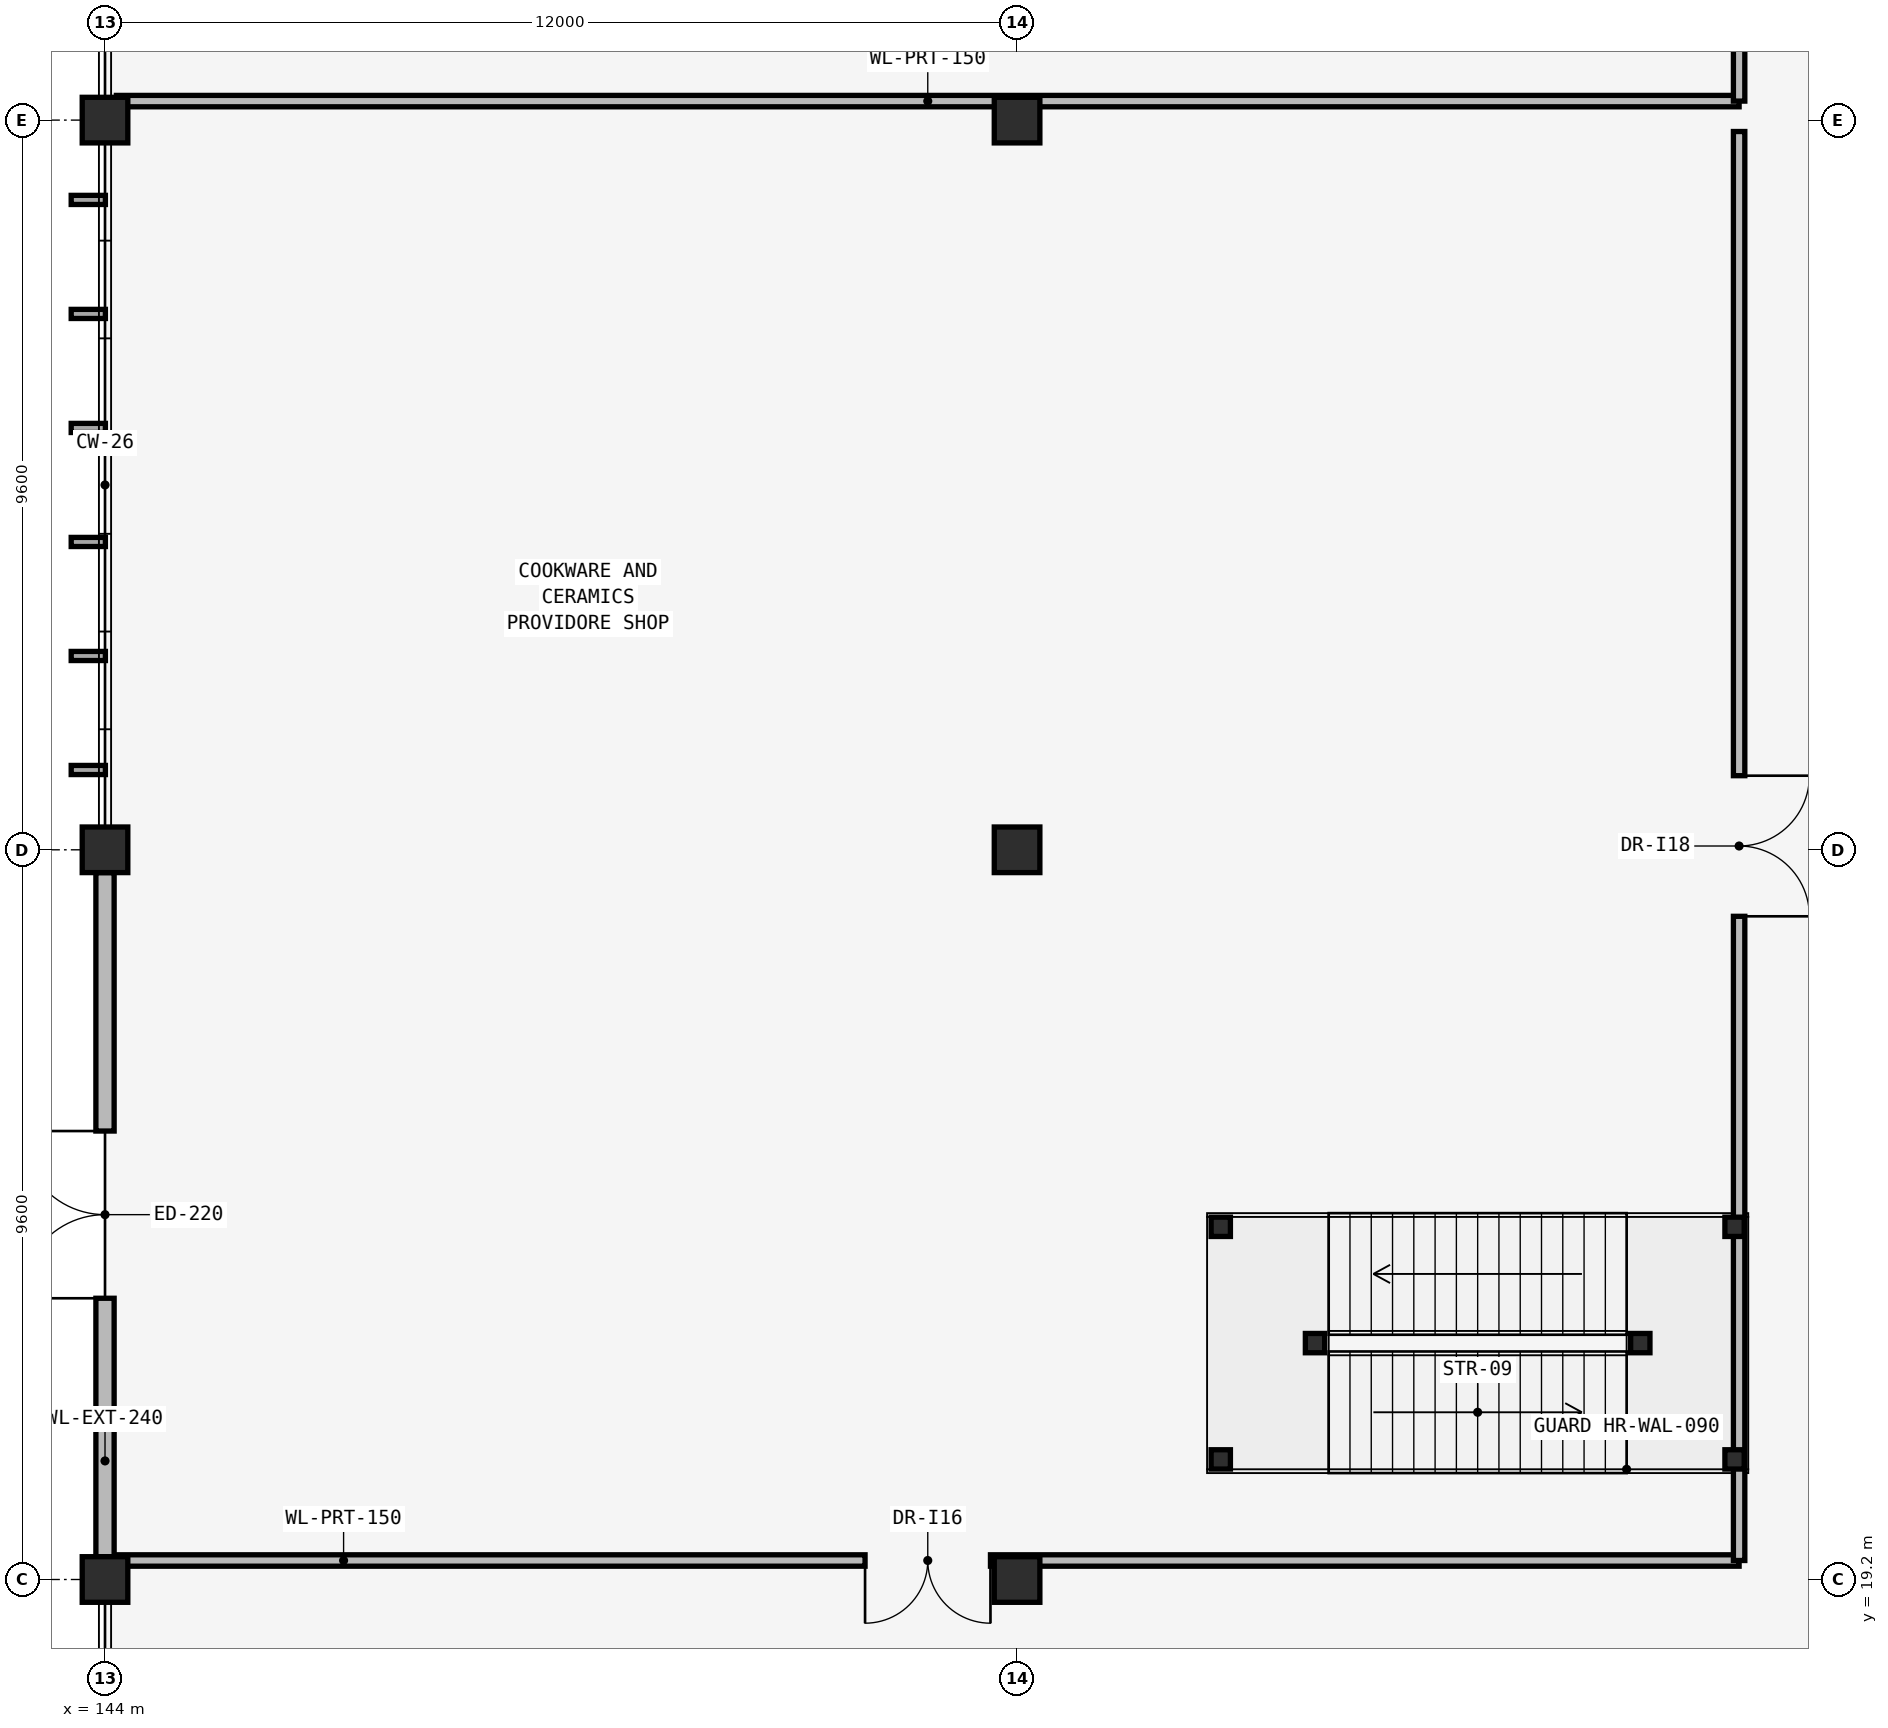
"""IFC4 building model, lengths in metres.
Left out: names, types, materials, properties, quantities, classifications, styles, units other than length and angle.
Written with IfcOpenShell. Run it as: python <this file> out.ifc"""

import sys

from ifc_helpers import new_model, si_unit, direction, frame, frame_2d, origin, origin_2d, place, context, subcontext, project, spatial, rectangle, i_section, extrude, element, fill, save


model = new_model("IFC4")
c1 = context("Model", 3, precision=1e-05, world=origin(), true_north=direction((0.0, 1.0)))
c2 = subcontext(c1, "Body", "Model", "MODEL_VIEW")
j1 = project(units=[si_unit("LENGTHUNIT", "METRE"), si_unit("PLANEANGLEUNIT", "RADIAN")], contexts=[c1])
p1 = place(None, origin())
s1 = spatial("IfcSite", under=j1, at=p1, CompositionType="ELEMENT")
p2 = place(p1, origin())
s2 = spatial("IfcBuilding", under=s1, at=p2, CompositionType="ELEMENT")
p3 = place(p2, origin())
s3 = spatial("IfcBuildingStorey", under=s2, at=p3, CompositionType="ELEMENT", Elevation=0.0)
for number, where, z_axis, x_axis in (
    (1, (144.0, 19.2, 0.0), (0.0, 0.0, 1.0), (1.0, 0.0, 0.0)),
    (2, (144.0, 28.8, 0.0), (0.0, 0.0, 1.0), (1.0, 0.0, 0.0)),
    (3, (144.0, 38.4, 0.0), (0.0, 0.0, 1.0), (1.0, 0.0, 0.0)),
    (4, (156.0, 19.2, 0.0), (0.0, 0.0, 1.0), (1.0, 0.0, 0.0)),
    (5, (156.0, 28.8, 0.0), (0.0, 0.0, 1.0), (1.0, 0.0, 0.0)),
    (6, (156.0, 38.4, 0.0), (0.0, 0.0, 1.0), (1.0, 0.0, 0.0)),
):
    element("IfcColumn", number, at=place(p3, frame(where, z_axis=z_axis, x_axis=x_axis)), inside=s3, PredefinedType="COLUMN", context=c2, shape_type="SweptSolid", body=[
        extrude(rectangle(XDim=0.6, YDim=0.6, at=origin_2d()), origin(), (0.0, 0.0, 1.0), 5.4),
    ])
for number, where, z_axis, x_axis in (
    (7, (165.44, 20.78, 0.0), (0.0, 0.0, 1.0), (1.0, 0.0, 0.0)),
    (8, (165.44, 23.84, 0.0), (0.0, 0.0, 1.0), (1.0, 0.0, 0.0)),
    (9, (164.2, 22.31, 0.0), (0.0, 0.0, 1.0), (1.0, 0.0, 0.0)),
    (10, (158.68, 20.78, 0.0), (0.0, 0.0, 1.0), (1.0, 0.0, 0.0)),
    (11, (158.68, 23.84, 0.0), (0.0, 0.0, 1.0), (1.0, 0.0, 0.0)),
    (12, (159.92, 22.31, 0.0), (0.0, 0.0, 1.0), (1.0, 0.0, 0.0)),
):
    element("IfcColumn", number, at=place(p3, frame(where, z_axis=z_axis, x_axis=x_axis)), inside=s3, PredefinedType="COLUMN", context=c2, shape_type="SweptSolid", body=[
        extrude(i_section(OverallWidth=0.254, OverallDepth=0.254, WebThickness=0.009, FlangeThickness=0.014, at=origin_2d()), origin(), (0.0, 0.0, 1.0), 5.2),
    ])
p4 = place(p3, frame((144.0, 19.5, 0.0), z_axis=(0.0, 0.0, 1.0), x_axis=(0.0, 1.0, 0.0)))
e13 = element("IfcWall", 13, at=p4, inside=s3, PredefinedType="SOLIDWALL", context=c2, shape_type="SweptSolid", body=[
    extrude(rectangle(XDim=9.0, YDim=0.24, at=frame_2d((4.5, 0.0))), origin(), (0.0, 0.0, 1.0), 4.321),
])
p5 = place(p4, frame((3.4, 0.0, 0.0)))
e14 = element("IfcOpeningElement", 14, at=p5, cuts=e13, PredefinedType="OPENING", context=c2, shape_type="SweptSolid", body=[
    extrude(rectangle(XDim=2.2, YDim=2.4, at=frame_2d((1.1, 1.2))), frame((0.0, 0.135, 0.0), z_axis=(0.0, -1.0, 0.0), x_axis=(1.0, 0.0, 0.0)), (0.0, 0.0, 1.0), 0.27),
])
p6 = place(p3, frame((144.15, 19.45, 0.0), z_axis=(0.0, 0.0, 1.0), x_axis=(1.0, 0.0, 0.0)))
e15 = element("IfcWall", 15, at=p6, inside=s3, PredefinedType="PARTITIONING", context=c2, shape_type="SweptSolid", body=[
    extrude(rectangle(XDim=21.35, YDim=0.15, at=frame_2d((10.675, 0.0))), origin(), (0.0, 0.0, 1.0), 5.08),
])
p7 = place(p6, frame((9.85, 0.0, 0.0)))
e16 = element("IfcOpeningElement", 16, at=p7, cuts=e15, PredefinedType="OPENING", context=c2, shape_type="SweptSolid", body=[
    extrude(rectangle(XDim=1.65, YDim=2.2, at=frame_2d((0.825, 1.1))), frame((0.0, 0.09, 0.0), z_axis=(0.0, -1.0, 0.0), x_axis=(1.0, 0.0, 0.0)), (0.0, 0.0, 1.0), 0.18),
])
p8 = place(p3, frame((165.5, 19.45, 0.0), z_axis=(0.0, 0.0, 1.0), x_axis=(0.0, 1.0, 0.0)))
e17 = element("IfcWall", 17, at=p8, inside=s3, PredefinedType="PARTITIONING", context=c2, shape_type="SweptSolid", body=[
    extrude(rectangle(XDim=18.8, YDim=0.15, at=frame_2d((9.4, 0.0))), origin(), (0.0, 0.0, 1.0), 5.08),
])
p9 = place(p8, frame((8.475, 0.0, 0.0)))
e18 = element("IfcOpeningElement", 18, at=p9, cuts=e17, PredefinedType="OPENING", context=c2, shape_type="SweptSolid", body=[
    extrude(rectangle(XDim=1.85, YDim=2.2, at=frame_2d((0.925, 1.1))), frame((0.0, 0.09, 0.0), z_axis=(0.0, -1.0, 0.0), x_axis=(1.0, 0.0, 0.0)), (0.0, 0.0, 1.0), 0.18),
])
p10 = place(p3, frame((144.15, 38.65, 0.0), z_axis=(0.0, 0.0, 1.0), x_axis=(1.0, 0.0, 0.0)))
e19 = element("IfcWall", 19, at=p10, inside=s3, PredefinedType="PARTITIONING", context=c2, shape_type="SweptSolid", body=[
    extrude(rectangle(XDim=21.35, YDim=0.15, at=frame_2d((10.675, 0.0))), origin(), (0.0, 0.0, 1.0), 5.08),
])
p11 = place(p3, frame((165.5, 38.65, 0.0), z_axis=(0.0, 0.0, 1.0), x_axis=(0.0, 1.0, 0.0)))
e20 = element("IfcWall", 20, at=p11, inside=s3, PredefinedType="PARTITIONING", context=c2, shape_type="SweptSolid", body=[
    extrude(rectangle(XDim=9.15, YDim=0.15, at=frame_2d((4.575, 0.0))), origin(), (0.0, 0.0, 1.0), 5.08),
])
p12 = place(p11, frame((4.125, 0.0, 0.0)))
e21 = element("IfcOpeningElement", 21, at=p12, cuts=e20, PredefinedType="OPENING", context=c2, shape_type="SweptSolid", body=[
    extrude(rectangle(XDim=0.9, YDim=2.05, at=frame_2d((0.45, 1.025))), frame((0.0, 0.09, 0.0), z_axis=(0.0, -1.0, 0.0), x_axis=(1.0, 0.0, 0.0)), (0.0, 0.0, 1.0), 0.18),
])
p13 = place(p5, origin())
e22 = element("IfcDoor", 22, at=p13, inside=s3, OperationType="DOUBLE_DOOR_SINGLE_SWING", PredefinedType="DOOR", context=c2, shape_type="SweptSolid", body=[
    extrude(rectangle(XDim=2.2, YDim=2.4, at=frame_2d((1.1, 1.2))), frame((0.0, 0.025, 0.0), z_axis=(0.0, -1.0, 0.0), x_axis=(1.0, 0.0, 0.0)), (0.0, 0.0, 1.0), 0.05),
])
fill(e14, e22)
p14 = place(p7, origin())
e23 = element("IfcDoor", 23, at=p14, inside=s3, OperationType="DOUBLE_DOOR_SINGLE_SWING", PredefinedType="DOOR", context=c2, shape_type="SweptSolid", body=[
    extrude(rectangle(XDim=1.65, YDim=2.2, at=frame_2d((0.825, 1.1))), frame((0.0, 0.025, 0.0), z_axis=(0.0, -1.0, 0.0), x_axis=(1.0, 0.0, 0.0)), (0.0, 0.0, 1.0), 0.05),
])
fill(e16, e23)
p15 = place(p9, origin())
e24 = element("IfcDoor", 24, at=p15, inside=s3, OperationType="DOUBLE_DOOR_SINGLE_SWING", PredefinedType="DOOR", context=c2, shape_type="SweptSolid", body=[
    extrude(rectangle(XDim=1.85, YDim=2.2, at=frame_2d((0.925, 1.1))), frame((0.0, 0.025, 0.0), z_axis=(0.0, -1.0, 0.0), x_axis=(1.0, 0.0, 0.0)), (0.0, 0.0, 1.0), 0.05),
])
fill(e18, e24)
save(model, sys.argv[1])
